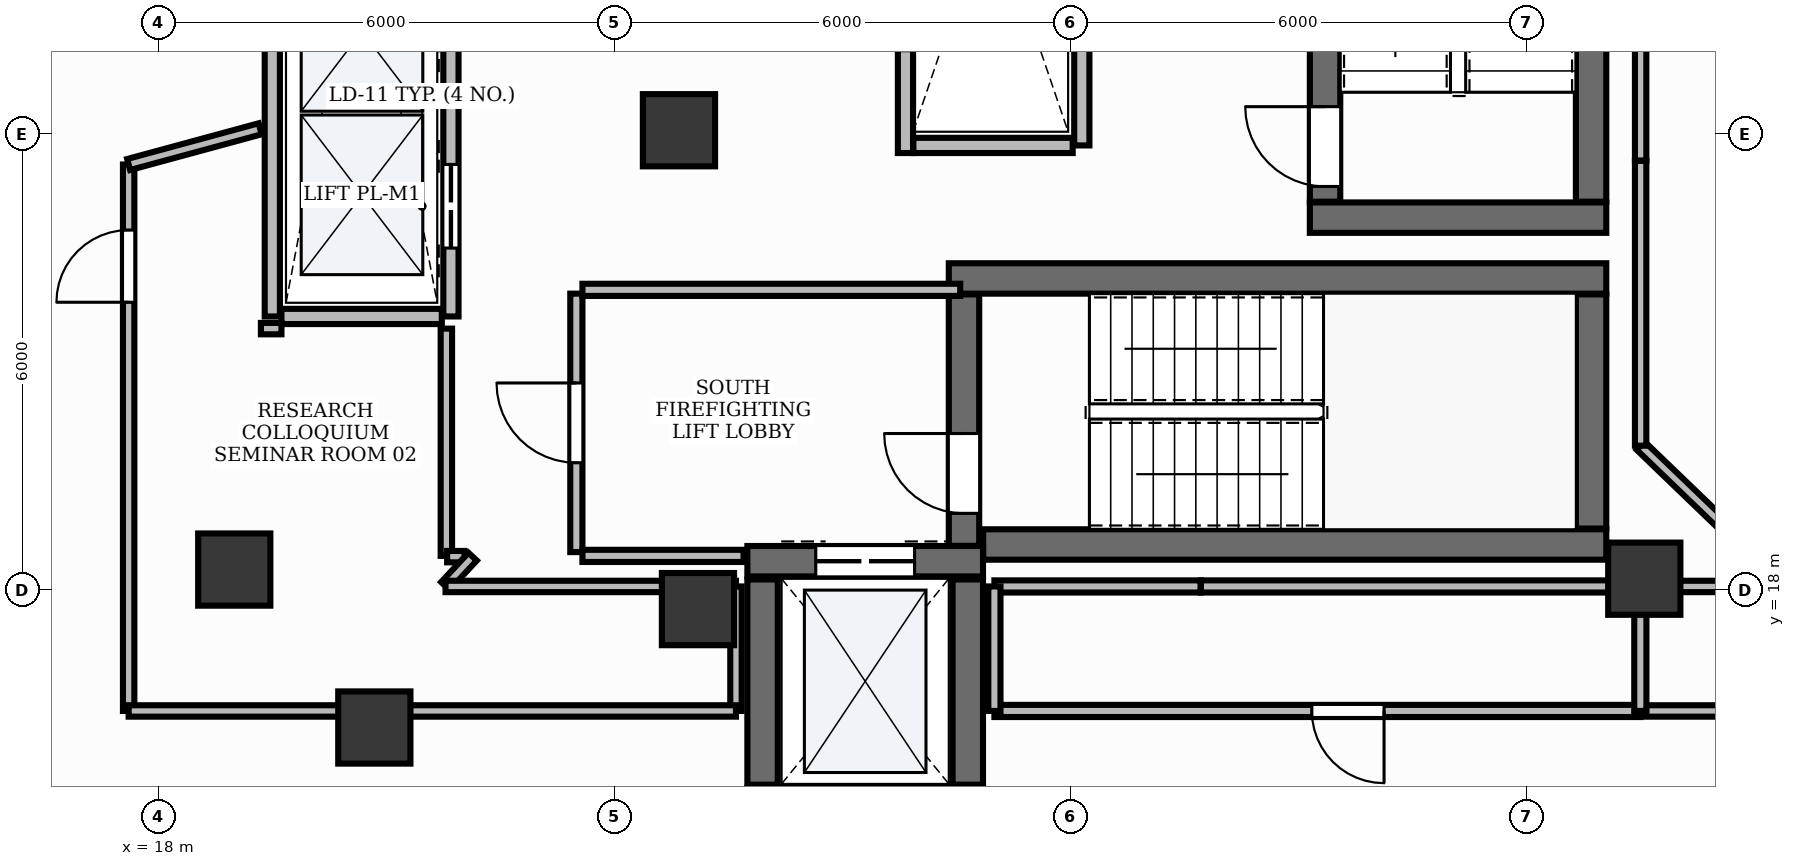
"""IFC4 building model, lengths in metres.
Left out: names, types, materials, properties, quantities, classifications, styles, units other than length and angle.
Written with IfcOpenShell. Run it as: python <this file> out.ifc"""

import sys

from ifc_helpers import new_model, si_unit, direction, frame, frame_2d, origin, origin_2d, place, context, subcontext, project, spatial, rectangle, extrude, element, fill, save


model = new_model("IFC4")
c1 = context("Model", 3, precision=1e-05, world=origin(), true_north=direction((0.0, 1.0)))
c2 = subcontext(c1, "Body", "Model", "MODEL_VIEW")
j1 = project(units=[si_unit("LENGTHUNIT", "METRE"), si_unit("PLANEANGLEUNIT", "RADIAN")], contexts=[c1])
p1 = place(None, origin())
s1 = spatial("IfcSite", under=j1, at=p1, CompositionType="ELEMENT")
p2 = place(p1, origin())
s2 = spatial("IfcBuilding", under=s1, at=p2, CompositionType="ELEMENT")
p3 = place(p2, frame((0.0, 0.0, 154.2)))
s3 = spatial("IfcBuildingStorey", under=s2, at=p3, CompositionType="ELEMENT", Elevation=154.2)
p4 = place(p3, frame((28.852, 18.6, 0.0), z_axis=(0.0, 0.0, 1.0), x_axis=(1.0, 0.0, 0.0)))
e1 = element("IfcWall", 1, at=p4, inside=s3, PredefinedType="SHEAR", context=c2, shape_type="SweptSolid", body=[
    extrude(rectangle(XDim=8.198, YDim=0.4, at=frame_2d((4.099, 0.0))), origin(), (0.0, 0.0, 1.0), 3.9),
])
p5 = place(p3, frame((28.4, 22.1, 0.0), z_axis=(0.0, 0.0, 1.0), x_axis=(1.0, 0.0, 0.0)))
e2 = element("IfcWall", 2, at=p5, inside=s3, PredefinedType="SHEAR", context=c2, shape_type="SweptSolid", body=[
    extrude(rectangle(XDim=8.65, YDim=0.4, at=frame_2d((4.325, 0.0))), origin(), (0.0, 0.0, 1.0), 3.9),
])
p6 = place(p3, frame((36.85, 18.81, 0.0), z_axis=(0.0, 0.0, 1.0), x_axis=(0.0, 1.0, 0.0)))
e3 = element("IfcWall", 3, at=p6, inside=s3, PredefinedType="SHEAR", context=c2, shape_type="SweptSolid", body=[
    extrude(rectangle(XDim=3.08, YDim=0.4, at=frame_2d((1.54, 0.0))), origin(), (0.0, 0.0, 1.0), 3.9),
])
p7 = place(p3, frame((28.6, 18.582, 0.0), z_axis=(0.0, 0.0, 1.0), x_axis=(0.0, 1.0, 0.0)))
e4 = element("IfcWall", 4, at=p7, inside=s3, PredefinedType="SHEAR", context=c2, shape_type="SweptSolid", body=[
    extrude(rectangle(XDim=3.308, YDim=0.4, at=frame_2d((1.654, 0.0))), origin(), (0.0, 0.0, 1.0), 3.9),
])
p8 = place(p7, frame((0.428, 0.0, 0.0)))
e5 = element("IfcOpeningElement", 5, at=p8, cuts=e4, PredefinedType="OPENING", context=c2, shape_type="SweptSolid", body=[
    extrude(rectangle(XDim=1.05, YDim=2.15, at=frame_2d((0.525, 1.075))), frame((0.0, 0.215, 0.0), z_axis=(0.0, -1.0, 0.0), x_axis=(1.0, 0.0, 0.0)), (0.0, 0.0, 1.0), 0.43),
])
p9 = place(p3, frame((33.15, 22.9, 0.0), z_axis=(0.0, 0.0, 1.0), x_axis=(1.0, 0.0, 0.0)))
e6 = element("IfcWall", 6, at=p9, inside=s3, PredefinedType="SHEAR", context=c2, shape_type="SweptSolid", body=[
    extrude(rectangle(XDim=3.9, YDim=0.4, at=frame_2d((1.95, 0.0))), origin(), (0.0, 0.0, 1.0), 3.9),
])
p10 = place(p3, frame((36.85, 23.11, 0.0), z_axis=(0.0, 0.0, 1.0), x_axis=(0.0, 1.0, 0.0)))
e7 = element("IfcWall", 7, at=p10, inside=s3, PredefinedType="SHEAR", context=c2, shape_type="SweptSolid", body=[
    extrude(rectangle(XDim=7.78, YDim=0.4, at=frame_2d((3.89, 0.0))), origin(), (0.0, 0.0, 1.0), 3.9),
])
p11 = place(p3, frame((33.35, 23.11, 0.0), z_axis=(0.0, 0.0, 1.0), x_axis=(0.0, 1.0, 0.0)))
e8 = element("IfcWall", 8, at=p11, inside=s3, PredefinedType="SHEAR", context=c2, shape_type="SweptSolid", body=[
    extrude(rectangle(XDim=7.78, YDim=0.4, at=frame_2d((3.89, 0.0))), origin(), (0.0, 0.0, 1.0), 3.9),
])
p12 = place(p11, frame((0.2, 0.0, 0.0)))
e9 = element("IfcOpeningElement", 9, at=p12, cuts=e8, PredefinedType="OPENING", context=c2, shape_type="SweptSolid", body=[
    extrude(rectangle(XDim=1.05, YDim=2.15, at=frame_2d((0.525, 1.075))), frame((0.0, 0.215, 0.0), z_axis=(0.0, -1.0, 0.0), x_axis=(1.0, 0.0, 0.0)), (0.0, 0.0, 1.0), 0.43),
])
p13 = place(p3, frame((25.75, 18.38, 0.0), z_axis=(0.0, 0.0, 1.0), x_axis=(1.0, 0.0, 0.0)))
e10 = element("IfcWall", 10, at=p13, inside=s3, PredefinedType="SHEAR", context=c2, shape_type="SweptSolid", body=[
    extrude(rectangle(XDim=3.1, YDim=0.4, at=frame_2d((1.55, 0.0))), origin(), (0.0, 0.0, 1.0), 3.9),
])
p14 = place(p13, frame((0.9, 0.0, 0.0)))
e11 = element("IfcOpeningElement", 11, at=p14, cuts=e10, PredefinedType="OPENING", context=c2, shape_type="SweptSolid", body=[
    extrude(rectangle(XDim=1.3, YDim=2.2, at=frame_2d((0.65, 1.1))), frame((0.0, 0.215, 0.0), z_axis=(0.0, -1.0, 0.0), x_axis=(1.0, 0.0, 0.0)), (0.0, 0.0, 1.0), 0.43),
])
for number, where, z_axis, x_axis in (
    (12, (25.95, 15.44, 0.0), (0.0, 0.0, 1.0), (0.0, 1.0, 0.0)),
    (13, (28.65, 15.44, 0.0), (0.0, 0.0, 1.0), (0.0, 1.0, 0.0)),
):
    element("IfcWall", number, at=place(p3, frame(where, z_axis=z_axis, x_axis=x_axis)), inside=s3, PredefinedType="SHEAR", context=c2, shape_type="SweptSolid", body=[
        extrude(rectangle(XDim=2.7, YDim=0.4, at=frame_2d((1.35, 0.0))), origin(), (0.0, 0.0, 1.0), 3.9),
    ])
for number, where, z_axis, x_axis in (
    (14, (24.85, 24.05, -0.0), (0.0, 0.0, 1.0), (1.0, 0.0, 0.0)),
    (15, (25.1, 17.75, -0.0), (0.0, 0.0, 1.0), (1.0, 0.0, 0.0)),
    (16, (37.55, 18.15, -0.0), (0.0, 0.0, 1.0), (1.0, 0.0, 0.0)),
):
    element("IfcColumn", number, at=place(p3, frame(where, z_axis=z_axis, x_axis=x_axis)), inside=s3, PredefinedType="PILASTER", context=c2, shape_type="SweptSolid", body=[
        extrude(rectangle(XDim=0.95, YDim=0.95, at=origin_2d()), origin(), (0.0, 0.0, 1.0), 3.901),
    ])
for number, where, z_axis, x_axis in (
    (17, (19.0, 18.27, -0.0), (0.0, 0.0, 1.0), (1.0, 0.0, 0.0)),
    (18, (20.842, 16.192, -0.0), (0.0, 0.0, 1.0), (1.0, 0.0, 0.0)),
):
    element("IfcColumn", number, at=place(p3, frame(where, z_axis=z_axis, x_axis=x_axis)), inside=s3, PredefinedType="COLUMN", context=c2, shape_type="SweptSolid", body=[
        extrude(rectangle(XDim=0.95, YDim=0.95, at=origin_2d()), origin(), (0.0, 0.0, 1.0), 3.901),
    ])
p15 = place(p3, frame((19.5, 21.6, 0.0), z_axis=(0.0, 0.0, 1.0), x_axis=(0.0, 1.0, 0.0)))
e19 = element("IfcWall", 19, at=p15, inside=s3, PredefinedType="PARTITIONING", context=c2, shape_type="SweptSolid", body=[
    extrude(rectangle(XDim=10.8, YDim=0.2, at=frame_2d((5.4, 0.0))), origin(), (0.0, 0.0, 1.0), 2.91),
])
p16 = place(p3, frame((21.85, 21.6, 0.0), z_axis=(0.0, 0.0, 1.0), x_axis=(0.0, 1.0, 0.0)))
e20 = element("IfcWall", 20, at=p16, inside=s3, PredefinedType="PARTITIONING", context=c2, shape_type="SweptSolid", body=[
    extrude(rectangle(XDim=10.8, YDim=0.2, at=frame_2d((5.4, 0.0))), origin(), (0.0, 0.0, 1.0), 2.91),
])
p17 = place(p16, frame((0.9, 0.0, 0.0)))
e21 = element("IfcOpeningElement", 21, at=p17, cuts=e20, PredefinedType="OPENING", context=c2, shape_type="SweptSolid", body=[
    extrude(rectangle(XDim=1.1, YDim=2.2, at=frame_2d((0.55, 1.1))), frame((0.0, 0.115, 0.0), z_axis=(0.0, -1.0, 0.0), x_axis=(1.0, 0.0, 0.0)), (0.0, 0.0, 1.0), 0.23),
])
p18 = place(p16, frame((3.6, 0.0, 0.0)))
e22 = element("IfcOpeningElement", 22, at=p18, cuts=e20, PredefinedType="OPENING", context=c2, shape_type="SweptSolid", body=[
    extrude(rectangle(XDim=1.1, YDim=2.2, at=frame_2d((0.55, 1.1))), frame((0.0, 0.115, 0.0), z_axis=(0.0, -1.0, 0.0), x_axis=(1.0, 0.0, 0.0)), (0.0, 0.0, 1.0), 0.23),
])
p19 = place(p16, frame((6.3, 0.0, 0.0)))
e23 = element("IfcOpeningElement", 23, at=p19, cuts=e20, PredefinedType="OPENING", context=c2, shape_type="SweptSolid", body=[
    extrude(rectangle(XDim=1.1, YDim=2.2, at=frame_2d((0.55, 1.1))), frame((0.0, 0.115, 0.0), z_axis=(0.0, -1.0, 0.0), x_axis=(1.0, 0.0, 0.0)), (0.0, 0.0, 1.0), 0.23),
])
p20 = place(p16, frame((9.0, 0.0, 0.0)))
e24 = element("IfcOpeningElement", 24, at=p20, cuts=e20, PredefinedType="OPENING", context=c2, shape_type="SweptSolid", body=[
    extrude(rectangle(XDim=1.1, YDim=2.2, at=frame_2d((0.55, 1.1))), frame((0.0, 0.115, 0.0), z_axis=(0.0, -1.0, 0.0), x_axis=(1.0, 0.0, 0.0)), (0.0, 0.0, 1.0), 0.23),
])
p21 = place(p3, frame((19.62, 21.6, 0.0), z_axis=(0.0, 0.0, 1.0), x_axis=(1.0, 0.0, 0.0)))
e25 = element("IfcWall", 25, at=p21, inside=s3, PredefinedType="PARTITIONING", context=c2, shape_type="SweptSolid", body=[
    extrude(rectangle(XDim=2.11, YDim=0.2, at=frame_2d((1.055, 0.0))), origin(), (0.0, 0.0, 1.0), 2.91),
])
p22 = place(p3, frame((27.83, 23.75, 0.0), z_axis=(0.0, 0.0, 1.0), x_axis=(0.0, 1.0, 0.0)))
e26 = element("IfcWall", 26, at=p22, inside=s3, PredefinedType="PARTITIONING", context=c2, shape_type="SweptSolid", body=[
    extrude(rectangle(XDim=1.366, YDim=0.2, at=frame_2d((0.683, 0.0))), origin(), (0.0, 0.0, 1.0), 2.91),
])
p23 = place(p3, frame((30.15, 23.85, 0.0), z_axis=(0.0, 0.0, 1.0), x_axis=(0.0, 1.0, 0.0)))
e27 = element("IfcWall", 27, at=p23, inside=s3, PredefinedType="PARTITIONING", context=c2, shape_type="SweptSolid", body=[
    extrude(rectangle(XDim=6.35, YDim=0.2, at=frame_2d((3.175, 0.0))), origin(), (0.0, 0.0, 1.0), 2.91),
])
p24 = place(p3, frame((27.934, 23.85, 0.0), z_axis=(0.0, 0.0, 1.0), x_axis=(1.0, 0.0, 0.0)))
e28 = element("IfcWall", 28, at=p24, inside=s3, PredefinedType="PARTITIONING", context=c2, shape_type="SweptSolid", body=[
    extrude(rectangle(XDim=2.096, YDim=0.2, at=frame_2d((1.048, 0.0))), origin(), (0.0, 0.0, 1.0), 2.91),
])
p25 = place(p3, frame((23.5, 18.5, 0.0), z_axis=(0.0, 0.0, 1.0), x_axis=(0.0, 1.0, 0.0)))
e29 = element("IfcWall", 29, at=p25, inside=s3, PredefinedType="PARTITIONING", context=c2, shape_type="SweptSolid", body=[
    extrude(rectangle(XDim=3.4, YDim=0.16, at=frame_2d((1.7, 0.0))), origin(), (0.0, 0.0, 1.0), 2.91),
])
p26 = place(p25, frame((1.175, 0.0, 0.0)))
e30 = element("IfcOpeningElement", 30, at=p26, cuts=e29, PredefinedType="OPENING", context=c2, shape_type="SweptSolid", body=[
    extrude(rectangle(XDim=1.05, YDim=2.15, at=frame_2d((0.525, 1.075))), frame((0.0, 0.095, 0.0), z_axis=(0.0, -1.0, 0.0), x_axis=(1.0, 0.0, 0.0)), (0.0, 0.0, 1.0), 0.19),
])
p27 = place(p3, frame((23.58, 21.95, 0.0), z_axis=(0.0, 0.0, 1.0), x_axis=(1.0, 0.0, 0.0)))
e31 = element("IfcWall", 31, at=p27, inside=s3, PredefinedType="PARTITIONING", context=c2, shape_type="SweptSolid", body=[
    extrude(rectangle(XDim=4.97, YDim=0.16, at=frame_2d((2.485, 0.0))), origin(), (0.0, 0.0, 1.0), 2.91),
])
p28 = place(p3, frame((23.58, 18.45, 0.0), z_axis=(0.0, 0.0, 1.0), x_axis=(1.0, 0.0, 0.0)))
e32 = element("IfcWall", 32, at=p28, inside=s3, PredefinedType="PARTITIONING", context=c2, shape_type="SweptSolid", body=[
    extrude(rectangle(XDim=2.12, YDim=0.16, at=frame_2d((1.06, 0.0))), origin(), (0.0, 0.0, 1.0), 2.91),
])
p29 = place(p3, frame((17.61, 16.41, 0.0), z_axis=(0.0, 0.0, 1.0), x_axis=(0.0, 1.0, 0.0)))
e33 = element("IfcWall", 33, at=p29, inside=s3, PredefinedType="PARTITIONING", context=c2, shape_type="SweptSolid", body=[
    extrude(rectangle(XDim=7.189, YDim=0.15, at=frame_2d((3.594, 0.0))), origin(), (0.0, 0.0, 1.0), 2.91),
])
p30 = place(p29, frame((5.377, 0.0, 0.0)))
e34 = element("IfcOpeningElement", 34, at=p30, cuts=e33, PredefinedType="OPENING", context=c2, shape_type="SweptSolid", body=[
    extrude(rectangle(XDim=0.95, YDim=2.15, at=frame_2d((0.475, 1.075))), frame((0.0, 0.09, 0.0), z_axis=(0.0, -1.0, 0.0), x_axis=(1.0, 0.0, 0.0)), (0.0, 0.0, 1.0), 0.18),
])
p31 = place(p3, frame((37.498, 16.41, 0.0), z_axis=(0.0, 0.0, 1.0), x_axis=(-1.0, 0.0, 0.0)))
e35 = element("IfcWall", 35, at=p31, inside=s3, PredefinedType="PARTITIONING", context=c2, shape_type="SweptSolid", body=[
    extrude(rectangle(XDim=8.498, YDim=0.16, at=frame_2d((4.249, 0.0))), origin(), (0.0, 0.0, 1.0), 2.91),
])
p32 = place(p31, frame((3.372, 0.0, 0.0)))
e36 = element("IfcOpeningElement", 36, at=p32, cuts=e35, PredefinedType="OPENING", context=c2, shape_type="SweptSolid", body=[
    extrude(rectangle(XDim=0.95, YDim=2.15, at=frame_2d((0.475, 1.075))), frame((0.0, 0.095, 0.0), z_axis=(0.0, -1.0, 0.0), x_axis=(1.0, 0.0, 0.0)), (0.0, 0.0, 1.0), 0.19),
])
p33 = place(p3, frame((44.5, 16.41, 0.0), z_axis=(0.0, 0.0, 1.0), x_axis=(-1.0, 0.0, 0.0)))
e37 = element("IfcWall", 37, at=p33, inside=s3, PredefinedType="PARTITIONING", context=c2, shape_type="SweptSolid", body=[
    extrude(rectangle(XDim=6.992, YDim=0.15, at=frame_2d((3.496, 0.0))), origin(), (0.0, 0.0, 1.0), 2.91),
])
p34 = place(p33, frame((4.334, 0.0, 0.0)))
e38 = element("IfcOpeningElement", 38, at=p34, cuts=e37, PredefinedType="OPENING", context=c2, shape_type="SweptSolid", body=[
    extrude(rectangle(XDim=0.95, YDim=2.15, at=frame_2d((0.475, 1.075))), frame((0.0, 0.09, 0.0), z_axis=(0.0, -1.0, 0.0), x_axis=(1.0, 0.0, 0.0)), (0.0, 0.0, 1.0), 0.18),
])
p35 = place(p3, frame((19.35, 21.44, 0.0), z_axis=(0.0, 0.0, 1.0), x_axis=(1.0, 0.0, 0.0)))
e39 = element("IfcWall", 39, at=p35, inside=s3, PredefinedType="PARTITIONING", context=c2, shape_type="SweptSolid", body=[
    extrude(rectangle(XDim=0.27, YDim=0.15, at=frame_2d((0.135, 0.0))), origin(), (0.0, 0.0, 1.0), 2.91),
])
p36 = place(p3, frame((21.79, 21.44, 0.0), z_axis=(0.0, 0.0, 1.0), x_axis=(0.0, -1.0, 0.0)))
e40 = element("IfcWall", 40, at=p36, inside=s3, PredefinedType="PARTITIONING", context=c2, shape_type="SweptSolid", body=[
    extrude(rectangle(XDim=2.99, YDim=0.15, at=frame_2d((1.495, 0.0))), origin(), (0.0, 0.0, 1.0), 2.91),
])
p37 = place(p3, frame((21.8, 18.44, 0.0), z_axis=(0.0, 0.0, 1.0), x_axis=(1.0, 0.0, 0.0)))
e41 = element("IfcWall", 41, at=p37, inside=s3, PredefinedType="PARTITIONING", context=c2, shape_type="SweptSolid", body=[
    extrude(rectangle(XDim=0.229, YDim=0.15, at=frame_2d((0.114, 0.0))), origin(), (0.0, 0.0, 1.0), 2.91),
])
p38 = place(p3, frame((22.135, 18.44, 0.0), z_axis=(0.0, 0.0, 1.0), x_axis=(-0.68187219697, -0.731471330265, 0.0)))
e42 = element("IfcWall", 42, at=p38, inside=s3, PredefinedType="PARTITIONING", context=c2, shape_type="SweptSolid", body=[
    extrude(rectangle(XDim=0.527, YDim=0.15, at=frame_2d((0.263, 0.0))), origin(), (0.0, 0.0, 1.0), 2.91),
])
p39 = place(p3, frame((21.779, 18.048, 0.0), z_axis=(0.0, 0.0, 1.0), x_axis=(1.0, 0.0, 0.0)))
e43 = element("IfcWall", 43, at=p39, inside=s3, PredefinedType="PARTITIONING", context=c2, shape_type="SweptSolid", body=[
    extrude(rectangle(XDim=3.821, YDim=0.15, at=frame_2d((1.91, 0.0))), origin(), (0.0, 0.0, 1.0), 2.91),
])
p40 = place(p3, frame((25.6, 18.048, 0.0), z_axis=(0.0, 0.0, 1.0), x_axis=(0.0, -1.0, 0.0)))
e44 = element("IfcWall", 44, at=p40, inside=s3, PredefinedType="PARTITIONING", context=c2, shape_type="SweptSolid", body=[
    extrude(rectangle(XDim=1.638, YDim=0.15, at=frame_2d((0.819, 0.0))), origin(), (0.0, 0.0, 1.0), 2.91),
])
p41 = place(p3, frame((25.6, 16.41, 0.0), z_axis=(0.0, 0.0, 1.0), x_axis=(-1.0, 0.0, 0.0)))
e45 = element("IfcWall", 45, at=p41, inside=s3, PredefinedType="PARTITIONING", context=c2, shape_type="SweptSolid", body=[
    extrude(rectangle(XDim=7.99, YDim=0.15, at=frame_2d((3.995, 0.0))), origin(), (0.0, 0.0, 1.0), 2.91),
])
p42 = place(p3, frame((17.61, 23.599, 0.0), z_axis=(0.0, 0.0, 1.0), x_axis=(0.96501483668, 0.262195280255, 0.0)))
e46 = element("IfcWall", 46, at=p42, inside=s3, PredefinedType="PARTITIONING", context=c2, shape_type="SweptSolid", body=[
    extrude(rectangle(XDim=1.792, YDim=0.15, at=frame_2d((0.896, 0.0))), origin(), (0.0, 0.0, 1.0), 2.91),
])
p43 = place(p3, frame((29.0, 18.048, 0.0), z_axis=(0.0, 0.0, 1.0), x_axis=(1.0, 0.0, 0.0)))
e47 = element("IfcWall", 47, at=p43, inside=s3, PredefinedType="PARTITIONING", context=c2, shape_type="SweptSolid", body=[
    extrude(rectangle(XDim=2.713, YDim=0.16, at=frame_2d((1.356, 0.0))), origin(), (0.0, 0.0, 1.0), 2.91),
])
p44 = place(p3, frame((31.717, 18.048, 0.0), z_axis=(0.0, 0.0, 1.0), x_axis=(1.0, 0.0, 0.0)))
e48 = element("IfcWall", 48, at=p44, inside=s3, PredefinedType="PARTITIONING", context=c2, shape_type="SweptSolid", body=[
    extrude(rectangle(XDim=5.781, YDim=0.16, at=frame_2d((2.89, 0.0))), origin(), (0.0, 0.0, 1.0), 2.91),
])
for number, where, z_axis, x_axis in (
    (49, (37.498, 18.048, 0.0), (0.0, 0.0, 1.0), (0.0, -1.0, 0.0)),
    (50, (29.0, 16.41, 0.0), (0.0, 0.0, 1.0), (0.0, 1.0, 0.0)),
):
    element("IfcWall", number, at=place(p3, frame(where, z_axis=z_axis, x_axis=x_axis)), inside=s3, PredefinedType="PARTITIONING", context=c2, shape_type="SweptSolid", body=[
        extrude(rectangle(XDim=1.638, YDim=0.16, at=frame_2d((0.819, 0.0))), origin(), (0.0, 0.0, 1.0), 2.91),
    ])
p45 = place(p3, frame((37.508, 18.048, 0.0), z_axis=(0.0, 0.0, 1.0), x_axis=(1.0, 0.0, 0.0)))
e51 = element("IfcWall", 51, at=p45, inside=s3, PredefinedType="PARTITIONING", context=c2, shape_type="SweptSolid", body=[
    extrude(rectangle(XDim=1.908, YDim=0.15, at=frame_2d((0.954, 0.0))), origin(), (0.0, 0.0, 1.0), 2.91),
])
p46 = place(p3, frame((39.419, 18.055, 0.0), z_axis=(0.0, 0.0, 1.0), x_axis=(-0.720561375154, 0.693391162791, 0.0)))
e52 = element("IfcWall", 52, at=p46, inside=s3, PredefinedType="PARTITIONING", context=c2, shape_type="SweptSolid", body=[
    extrude(rectangle(XDim=2.66, YDim=0.15, at=frame_2d((1.33, 0.0))), origin(), (0.0, 0.0, 1.0), 2.91),
])
p47 = place(p3, frame((37.502, 19.899, 0.0), z_axis=(0.0, 0.0, 1.0), x_axis=(0.0, 1.0, 0.0)))
e53 = element("IfcWall", 53, at=p47, inside=s3, PredefinedType="PARTITIONING", context=c2, shape_type="SweptSolid", body=[
    extrude(rectangle(XDim=3.749, YDim=0.15, at=frame_2d((1.874, 0.0))), origin(), (0.0, 0.0, 1.0), 2.91),
])
p48 = place(p3, frame((37.502, 23.652, 0.0), z_axis=(0.0, 0.0, 1.0), x_axis=(0.0, 1.0, 0.0)))
e54 = element("IfcWall", 54, at=p48, inside=s3, PredefinedType="PARTITIONING", context=c2, shape_type="SweptSolid", body=[
    extrude(rectangle(XDim=1.546, YDim=0.15, at=frame_2d((0.773, 0.0))), origin(), (0.0, 0.0, 1.0), 2.91),
])
p49 = place(p8, origin())
e55 = element("IfcDoor", 55, at=p49, inside=s3, OperationType="SINGLE_SWING_RIGHT", PredefinedType="DOOR", context=c2, shape_type="SweptSolid", body=[
    extrude(rectangle(XDim=1.05, YDim=2.15, at=frame_2d((0.525, 1.075))), frame((0.0, 0.025, 0.0), z_axis=(0.0, -1.0, 0.0), x_axis=(1.0, 0.0, 0.0)), (0.0, 0.0, 1.0), 0.05),
])
fill(e5, e55)
p50 = place(p12, origin())
e56 = element("IfcDoor", 56, at=p50, inside=s3, OperationType="SINGLE_SWING_RIGHT", PredefinedType="DOOR", context=c2, shape_type="SweptSolid", body=[
    extrude(rectangle(XDim=1.05, YDim=2.15, at=frame_2d((0.525, 1.075))), frame((0.0, 0.025, 0.0), z_axis=(0.0, -1.0, 0.0), x_axis=(1.0, 0.0, 0.0)), (0.0, 0.0, 1.0), 0.05),
])
fill(e9, e56)
p51 = place(p17, origin())
e57 = element("IfcDoor", 57, at=p51, inside=s3, OperationType="DOUBLE_DOOR_SLIDING", PredefinedType="DOOR", context=c2, shape_type="SweptSolid", body=[
    extrude(rectangle(XDim=1.1, YDim=2.2, at=frame_2d((0.55, 1.1))), frame((0.0, 0.025, 0.0), z_axis=(0.0, -1.0, 0.0), x_axis=(1.0, 0.0, 0.0)), (0.0, 0.0, 1.0), 0.05),
])
fill(e21, e57)
p52 = place(p14, origin())
e58 = element("IfcDoor", 58, at=p52, inside=s3, OperationType="DOUBLE_DOOR_SLIDING", PredefinedType="DOOR", context=c2, shape_type="SweptSolid", body=[
    extrude(rectangle(XDim=1.3, YDim=2.2, at=frame_2d((0.65, 1.1))), frame((0.0, 0.025, 0.0), z_axis=(0.0, -1.0, 0.0), x_axis=(1.0, 0.0, 0.0)), (0.0, 0.0, 1.0), 0.05),
])
fill(e11, e58)
p53 = place(p26, origin())
e59 = element("IfcDoor", 59, at=p53, inside=s3, OperationType="SINGLE_SWING_RIGHT", PredefinedType="DOOR", context=c2, shape_type="SweptSolid", body=[
    extrude(rectangle(XDim=1.05, YDim=2.15, at=frame_2d((0.525, 1.075))), frame((0.0, 0.025, 0.0), z_axis=(0.0, -1.0, 0.0), x_axis=(1.0, 0.0, 0.0)), (0.0, 0.0, 1.0), 0.05),
])
fill(e30, e59)
p54 = place(p30, origin())
e60 = element("IfcDoor", 60, at=p54, inside=s3, OperationType="SINGLE_SWING_LEFT", PredefinedType="DOOR", context=c2, shape_type="SweptSolid", body=[
    extrude(rectangle(XDim=0.95, YDim=2.15, at=frame_2d((0.475, 1.075))), frame((0.0, 0.025, 0.0), z_axis=(0.0, -1.0, 0.0), x_axis=(1.0, 0.0, 0.0)), (0.0, 0.0, 1.0), 0.05),
])
fill(e34, e60)
p55 = place(p32, origin())
e61 = element("IfcDoor", 61, at=p55, inside=s3, OperationType="SINGLE_SWING_LEFT", PredefinedType="DOOR", context=c2, shape_type="SweptSolid", body=[
    extrude(rectangle(XDim=0.95, YDim=2.15, at=frame_2d((0.475, 1.075))), frame((0.0, 0.025, 0.0), z_axis=(0.0, -1.0, 0.0), x_axis=(1.0, 0.0, 0.0)), (0.0, 0.0, 1.0), 0.05),
])
fill(e36, e61)
save(model, sys.argv[1])
